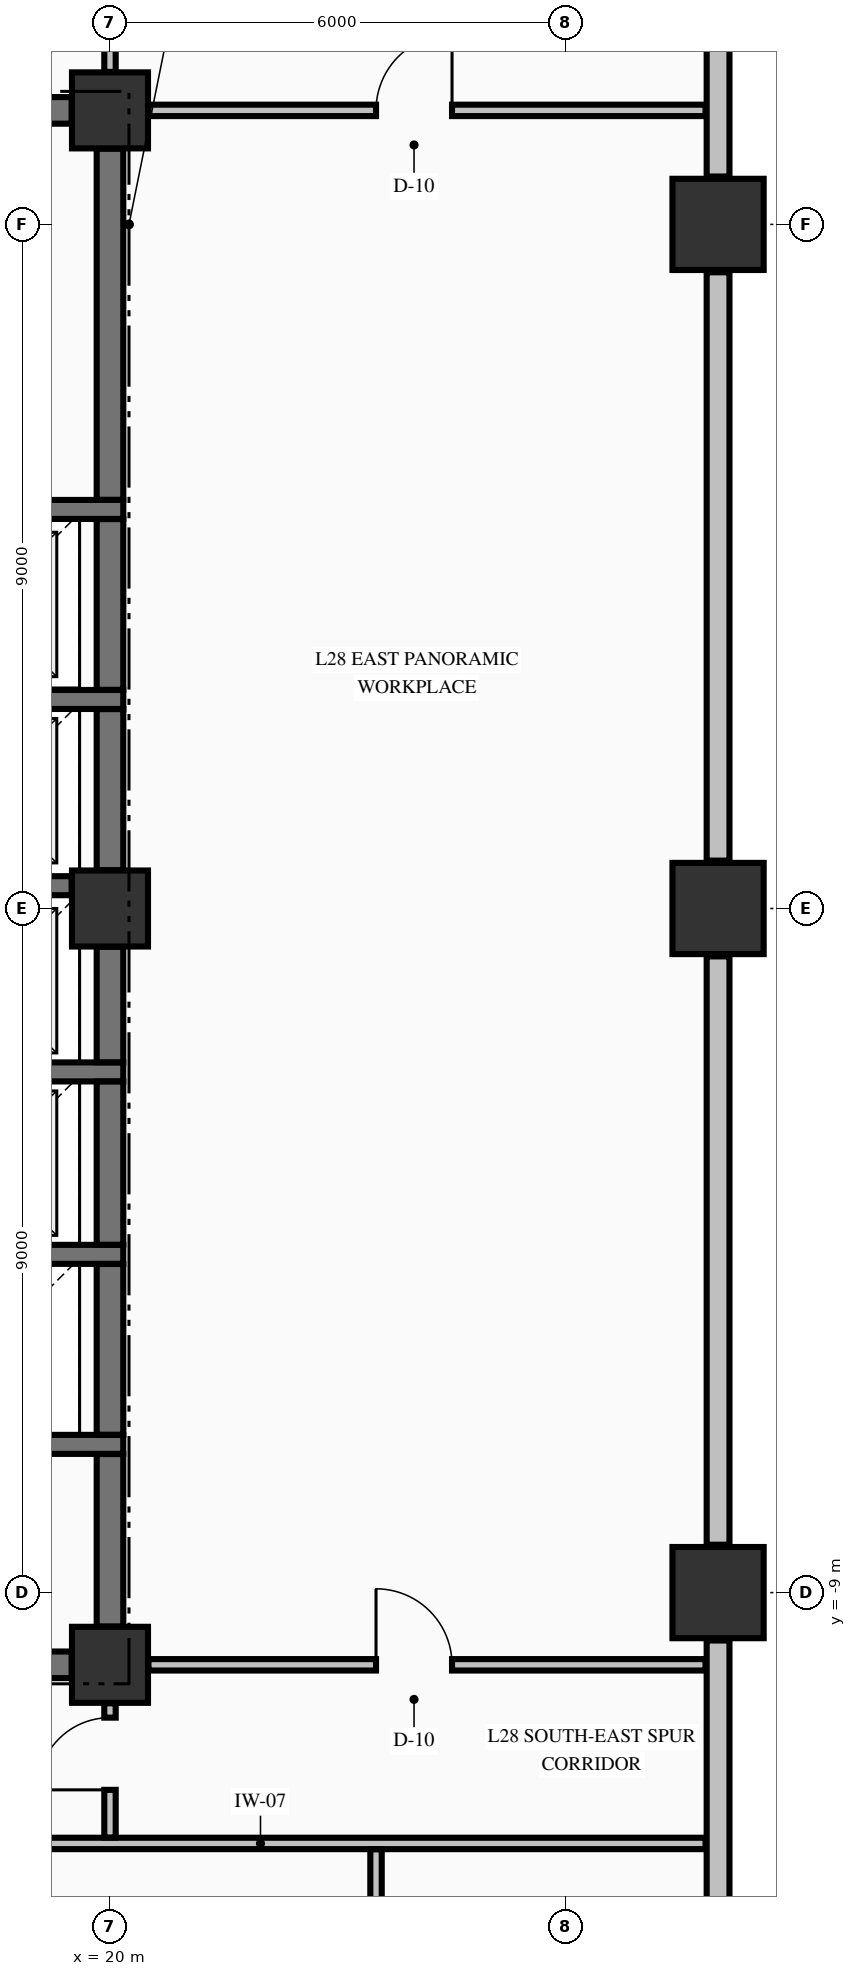
"""IFC4 building model, lengths in metres.
Left out: names, types, materials, properties, quantities, classifications, styles, units other than length and angle.
Written with IfcOpenShell. Run it as: python <this file> out.ifc"""

import sys

from ifc_helpers import new_model, si_unit, direction, frame, frame_2d, origin, origin_2d, place, context, subcontext, project, spatial, rectangle, extrude, element, fill, save


model = new_model("IFC4")
c1 = context("Model", 3, precision=1e-05, world=origin(), true_north=direction((0.0, 1.0)))
c2 = subcontext(c1, "Body", "Model", "MODEL_VIEW")
j1 = project(units=[si_unit("LENGTHUNIT", "METRE"), si_unit("PLANEANGLEUNIT", "RADIAN")], contexts=[c1])
p1 = place(None, origin())
s1 = spatial("IfcSite", under=j1, at=p1, CompositionType="ELEMENT")
p2 = place(p1, origin())
s2 = spatial("IfcBuilding", under=s1, at=p2, CompositionType="ELEMENT")
p3 = place(p2, frame((0.0, 0.0, 112.78)))
s3 = spatial("IfcBuildingStorey", under=s2, at=p3, CompositionType="ELEMENT", Elevation=112.78)
for number, where, z_axis, x_axis in (
    (1, (28.0, -9.0, -0.25), (0.0, 0.0, 1.0), (1.0, 0.0, 0.0)),
    (2, (28.0, 0.0, -0.25), (0.0, 0.0, 1.0), (1.0, 0.0, 0.0)),
    (3, (28.0, 9.0, -0.25), (0.0, 0.0, 1.0), (1.0, 0.0, 0.0)),
):
    element("IfcColumn", number, at=place(p3, frame(where, z_axis=z_axis, x_axis=x_axis)), inside=s3, PredefinedType="COLUMN", context=c2, shape_type="SweptSolid", body=[
        extrude(rectangle(XDim=1.2, YDim=1.2, at=origin_2d()), origin(), (0.0, 0.0, 1.0), 3.395),
    ])
for number, where, z_axis, x_axis in (
    (4, (20.0, -9.95, -0.25), (0.0, 0.0, 1.0), (1.0, 0.0, 0.0)),
    (5, (20.0, 10.5, -0.25), (0.0, 0.0, 1.0), (1.0, 0.0, 0.0)),
    (6, (20.0, 0.0, -0.25), (0.0, 0.0, 1.0), (1.0, 0.0, 0.0)),
):
    element("IfcColumn", number, at=place(p3, frame(where, z_axis=z_axis, x_axis=x_axis)), inside=s3, PredefinedType="COLUMN", context=c2, shape_type="SweptSolid", body=[
        extrude(rectangle(XDim=1.0, YDim=1.0, at=origin_2d()), origin(), (0.0, 0.0, 1.0), 3.395),
    ])
p4 = place(p3, frame((28.0, -20.37, 0.0), z_axis=(0.0, 0.0, 1.0), x_axis=(0.0, 1.0, 0.0)))
e7 = element("IfcWall", 7, at=p4, inside=s3, PredefinedType="STANDARD", context=c2, shape_type="SweptSolid", body=[
    extrude(rectangle(XDim=10.74, YDim=0.3, at=frame_2d((5.37, 0.0))), origin(), (0.0, 0.0, 1.0), 2.537),
])
for number, where, z_axis, x_axis in (
    (8, (28.0, -8.37, 0.0), (0.0, 0.0, 1.0), (0.0, 1.0, 0.0)),
    (9, (28.0, 0.63, 0.0), (0.0, 0.0, 1.0), (0.0, 1.0, 0.0)),
):
    element("IfcWall", number, at=place(p3, frame(where, z_axis=z_axis, x_axis=x_axis)), inside=s3, PredefinedType="STANDARD", context=c2, shape_type="SweptSolid", body=[
        extrude(rectangle(XDim=7.74, YDim=0.3, at=frame_2d((3.87, 0.0))), origin(), (0.0, 0.0, 1.0), 2.537),
    ])
p5 = place(p3, frame((28.0, 9.63, 0.0), z_axis=(0.0, 0.0, 1.0), x_axis=(0.0, 1.0, 0.0)))
e10 = element("IfcWall", 10, at=p5, inside=s3, PredefinedType="STANDARD", context=c2, shape_type="SweptSolid", body=[
    extrude(rectangle(XDim=10.74, YDim=0.3, at=frame_2d((5.37, 0.0))), origin(), (0.0, 0.0, 1.0), 2.537),
])
p6 = place(p3, frame((14.7, -9.95, 0.0), z_axis=(0.0, 0.0, 1.0), x_axis=(1.0, 0.0, 0.0)))
e11 = element("IfcWall", 11, at=p6, inside=s3, PredefinedType="SHEAR", context=c2, shape_type="SweptSolid", body=[
    extrude(rectangle(XDim=4.796, YDim=0.35, at=frame_2d((2.398, 0.0))), origin(), (0.0, 0.0, 1.0), 3.145),
])
p7 = place(p6, frame((0.65, 0.0, 0.0)))
e12 = element("IfcOpeningElement", 12, at=p7, cuts=e11, PredefinedType="OPENING", context=c2, shape_type="SweptSolid", body=[
    extrude(rectangle(XDim=1.2, YDim=2.15, at=frame_2d((0.6, 1.075))), frame((0.0, 0.185, 0.0), z_axis=(0.0, -1.0, 0.0), x_axis=(1.0, 0.0, 0.0)), (0.0, 0.0, 1.0), 0.37),
])
for number, where, z_axis, x_axis in (
    (13, (17.025, -7.05, 0.0), (0.0, 0.0, 1.0), (1.0, 0.0, 0.0)),
    (14, (17.025, -4.55, 0.0), (0.0, 0.0, 1.0), (1.0, 0.0, 0.0)),
    (15, (17.025, -2.15, 0.0), (0.0, 0.0, 1.0), (1.0, 0.0, 0.0)),
):
    element("IfcWall", number, at=place(p3, frame(where, z_axis=z_axis, x_axis=x_axis)), inside=s3, PredefinedType="SOLIDWALL", context=c2, shape_type="SweptSolid", body=[
        extrude(rectangle(XDim=3.15, YDim=0.25, at=frame_2d((1.575, 0.0))), origin(), (0.0, 0.0, 1.0), 3.145),
    ])
p8 = place(p3, frame((17.025, 0.3, 0.0), z_axis=(0.0, 0.0, 1.0), x_axis=(1.0, 0.0, 0.0)))
e16 = element("IfcWall", 16, at=p8, inside=s3, PredefinedType="SOLIDWALL", context=c2, shape_type="SweptSolid", body=[
    extrude(rectangle(XDim=2.471, YDim=0.25, at=frame_2d((1.236, 0.0))), origin(), (0.0, 0.0, 1.0), 3.145),
])
for number, where, z_axis, x_axis in (
    (17, (17.025, 2.75, 0.0), (0.0, 0.0, 1.0), (1.0, 0.0, 0.0)),
    (18, (17.025, 5.25, 0.0), (0.0, 0.0, 1.0), (1.0, 0.0, 0.0)),
):
    element("IfcWall", number, at=place(p3, frame(where, z_axis=z_axis, x_axis=x_axis)), inside=s3, PredefinedType="SOLIDWALL", context=c2, shape_type="SweptSolid", body=[
        extrude(rectangle(XDim=3.15, YDim=0.25, at=frame_2d((1.575, 0.0))), origin(), (0.0, 0.0, 1.0), 3.145),
    ])
p9 = place(p3, frame((14.7, 10.5, 0.0), z_axis=(0.0, 0.0, 1.0), x_axis=(1.0, 0.0, 0.0)))
e19 = element("IfcWall", 19, at=p9, inside=s3, PredefinedType="SHEAR", context=c2, shape_type="SweptSolid", body=[
    extrude(rectangle(XDim=4.796, YDim=0.35, at=frame_2d((2.398, 0.0))), origin(), (0.0, 0.0, 1.0), 3.145),
])
p10 = place(p9, frame((0.65, 0.0, 0.0)))
e20 = element("IfcOpeningElement", 20, at=p10, cuts=e19, PredefinedType="OPENING", context=c2, shape_type="SweptSolid", body=[
    extrude(rectangle(XDim=1.2, YDim=2.15, at=frame_2d((0.6, 1.075))), frame((0.0, 0.185, 0.0), z_axis=(0.0, -1.0, 0.0), x_axis=(1.0, 0.0, 0.0)), (0.0, 0.0, 1.0), 0.37),
])
p11 = place(p9, frame((3.25, 0.0, 0.0)))
e21 = element("IfcOpeningElement", 21, at=p11, cuts=e19, PredefinedType="OPENING", context=c2, shape_type="SweptSolid", body=[
    extrude(rectangle(XDim=0.9, YDim=2.15, at=frame_2d((0.45, 1.075))), frame((0.0, 0.185, 0.0), z_axis=(0.0, -1.0, 0.0), x_axis=(1.0, 0.0, 0.0)), (0.0, 0.0, 1.0), 0.37),
])
p12 = place(p3, frame((-22.835, -12.3, 0.0), z_axis=(0.0, 0.0, 1.0), x_axis=(1.0, 0.0, 0.0)))
e22 = element("IfcWall", 22, at=p12, inside=s3, PredefinedType="PARTITIONING", context=c2, shape_type="SweptSolid", body=[
    extrude(rectangle(XDim=50.67, YDim=0.15, at=frame_2d((25.335, 0.0))), origin(), (0.0, 0.0, 1.0), 3.145),
])
p13 = place(p12, frame((7.21, 0.0, 0.0)))
e23 = element("IfcOpeningElement", 23, at=p13, cuts=e22, PredefinedType="OPENING", context=c2, shape_type="SweptSolid", body=[
    extrude(rectangle(XDim=0.95, YDim=2.15, at=frame_2d((0.475, 1.075))), frame((0.0, 0.085, 0.0), z_axis=(0.0, -1.0, 0.0), x_axis=(1.0, 0.0, 0.0)), (0.0, 0.0, 1.0), 0.17),
])
p14 = place(p12, frame((16.81, 0.0, 0.0)))
e24 = element("IfcOpeningElement", 24, at=p14, cuts=e22, PredefinedType="OPENING", context=c2, shape_type="SweptSolid", body=[
    extrude(rectangle(XDim=1.05, YDim=2.15, at=frame_2d((0.525, 1.075))), frame((0.0, 0.085, 0.0), z_axis=(0.0, -1.0, 0.0), x_axis=(1.0, 0.0, 0.0)), (0.0, 0.0, 1.0), 0.17),
])
p15 = place(p12, frame((28.41, 0.0, 0.0)))
e25 = element("IfcOpeningElement", 25, at=p15, cuts=e22, PredefinedType="OPENING", context=c2, shape_type="SweptSolid", body=[
    extrude(rectangle(XDim=1.05, YDim=2.15, at=frame_2d((0.525, 1.075))), frame((0.0, 0.085, 0.0), z_axis=(0.0, -1.0, 0.0), x_axis=(1.0, 0.0, 0.0)), (0.0, 0.0, 1.0), 0.17),
])
p16 = place(p12, frame((37.91, 0.0, 0.0)))
e26 = element("IfcOpeningElement", 26, at=p16, cuts=e22, PredefinedType="OPENING", context=c2, shape_type="SweptSolid", body=[
    extrude(rectangle(XDim=1.05, YDim=2.15, at=frame_2d((0.525, 1.075))), frame((0.0, 0.085, 0.0), z_axis=(0.0, -1.0, 0.0), x_axis=(1.0, 0.0, 0.0)), (0.0, 0.0, 1.0), 0.17),
])
p17 = place(p3, frame((20.506, -9.95, 0.0), z_axis=(0.0, 0.0, 1.0), x_axis=(1.0, 0.0, 0.0)))
e27 = element("IfcWall", 27, at=p17, inside=s3, PredefinedType="PARTITIONING", context=c2, shape_type="SweptSolid", body=[
    extrude(rectangle(XDim=7.329, YDim=0.15, at=frame_2d((3.665, 0.0))), origin(), (0.0, 0.0, 1.0), 3.145),
])
p18 = place(p17, frame((2.994, 0.0, 0.0)))
e28 = element("IfcOpeningElement", 28, at=p18, cuts=e27, PredefinedType="OPENING", context=c2, shape_type="SweptSolid", body=[
    extrude(rectangle(XDim=1.0, YDim=2.15, at=frame_2d((0.5, 1.075))), frame((0.0, 0.085, 0.0), z_axis=(0.0, -1.0, 0.0), x_axis=(1.0, 0.0, 0.0)), (0.0, 0.0, 1.0), 0.17),
])
p19 = place(p3, frame((20.506, 10.5, 0.0), z_axis=(0.0, 0.0, 1.0), x_axis=(1.0, 0.0, 0.0)))
e29 = element("IfcWall", 29, at=p19, inside=s3, PredefinedType="PARTITIONING", context=c2, shape_type="SweptSolid", body=[
    extrude(rectangle(XDim=7.329, YDim=0.15, at=frame_2d((3.665, 0.0))), origin(), (0.0, 0.0, 1.0), 3.145),
])
p20 = place(p19, frame((2.994, 0.0, 0.0)))
e30 = element("IfcOpeningElement", 30, at=p20, cuts=e29, PredefinedType="OPENING", context=c2, shape_type="SweptSolid", body=[
    extrude(rectangle(XDim=1.0, YDim=2.15, at=frame_2d((0.5, 1.075))), frame((0.0, 0.085, 0.0), z_axis=(0.0, -1.0, 0.0), x_axis=(1.0, 0.0, 0.0)), (0.0, 0.0, 1.0), 0.17),
])
p21 = place(p3, frame((20.0, -9.446, 0.0), z_axis=(0.0, 0.0, 1.0), x_axis=(0.0, 1.0, 0.0)))
e31 = element("IfcWall", 31, at=p21, inside=s3, PredefinedType="SHEAR", context=c2, shape_type="SweptSolid", body=[
    extrude(rectangle(XDim=2.269, YDim=0.35, at=frame_2d((1.135, 0.0))), origin(), (0.0, 0.0, 1.0), 3.145),
])
p22 = place(p3, frame((20.0, -6.923, 0.0), z_axis=(0.0, 0.0, 1.0), x_axis=(0.0, 1.0, 0.0)))
e32 = element("IfcWall", 32, at=p22, inside=s3, PredefinedType="SHEAR", context=c2, shape_type="SweptSolid", body=[
    extrude(rectangle(XDim=2.246, YDim=0.35, at=frame_2d((1.123, 0.0))), origin(), (0.0, 0.0, 1.0), 3.145),
])
p23 = place(p3, frame((20.0, -4.423, 0.0), z_axis=(0.0, 0.0, 1.0), x_axis=(0.0, 1.0, 0.0)))
e33 = element("IfcWall", 33, at=p23, inside=s3, PredefinedType="SHEAR", context=c2, shape_type="SweptSolid", body=[
    extrude(rectangle(XDim=2.146, YDim=0.35, at=frame_2d((1.073, 0.0))), origin(), (0.0, 0.0, 1.0), 3.145),
])
p24 = place(p3, frame((20.0, -2.023, 0.0), z_axis=(0.0, 0.0, 1.0), x_axis=(0.0, 1.0, 0.0)))
e34 = element("IfcWall", 34, at=p24, inside=s3, PredefinedType="SHEAR", context=c2, shape_type="SweptSolid", body=[
    extrude(rectangle(XDim=1.519, YDim=0.35, at=frame_2d((0.76, 0.0))), origin(), (0.0, 0.0, 1.0), 3.145),
])
p25 = place(p3, frame((20.0, 0.504, 0.0), z_axis=(0.0, 0.0, 1.0), x_axis=(0.0, 1.0, 0.0)))
e35 = element("IfcWall", 35, at=p25, inside=s3, PredefinedType="SHEAR", context=c2, shape_type="SweptSolid", body=[
    extrude(rectangle(XDim=2.119, YDim=0.35, at=frame_2d((1.06, 0.0))), origin(), (0.0, 0.0, 1.0), 3.145),
])
p26 = place(p3, frame((20.0, 2.877, 0.0), z_axis=(0.0, 0.0, 1.0), x_axis=(0.0, 1.0, 0.0)))
e36 = element("IfcWall", 36, at=p26, inside=s3, PredefinedType="SHEAR", context=c2, shape_type="SweptSolid", body=[
    extrude(rectangle(XDim=2.246, YDim=0.35, at=frame_2d((1.123, 0.0))), origin(), (0.0, 0.0, 1.0), 3.145),
])
p27 = place(p3, frame((20.0, 5.377, 0.0), z_axis=(0.0, 0.0, 1.0), x_axis=(0.0, 1.0, 0.0)))
e37 = element("IfcWall", 37, at=p27, inside=s3, PredefinedType="SHEAR", context=c2, shape_type="SweptSolid", body=[
    extrude(rectangle(XDim=4.619, YDim=0.35, at=frame_2d((2.31, 0.0))), origin(), (0.0, 0.0, 1.0), 3.145),
])
p28 = place(p3, frame((20.0, -12.222, 0.0), z_axis=(0.0, 0.0, 1.0), x_axis=(0.0, 1.0, 0.0)))
e38 = element("IfcWall", 38, at=p28, inside=s3, PredefinedType="PARTITIONING", context=c2, shape_type="SweptSolid", body=[
    extrude(rectangle(XDim=1.766, YDim=0.15, at=frame_2d((0.883, 0.0))), origin(), (0.0, 0.0, 1.0), 2.635),
])
p29 = place(p28, frame((0.627, 0.0, 0.0)))
e39 = element("IfcOpeningElement", 39, at=p29, cuts=e38, PredefinedType="OPENING", context=c2, shape_type="SweptSolid", body=[
    extrude(rectangle(XDim=0.95, YDim=2.15, at=frame_2d((0.475, 1.075))), frame((0.0, 0.085, 0.0), z_axis=(0.0, -1.0, 0.0), x_axis=(1.0, 0.0, 0.0)), (0.0, 0.0, 1.0), 0.17),
])
p30 = place(p3, frame((20.0, 11.006, 0.0), z_axis=(0.0, 0.0, 1.0), x_axis=(0.0, 1.0, 0.0)))
e40 = element("IfcWall", 40, at=p30, inside=s3, PredefinedType="PARTITIONING", context=c2, shape_type="SweptSolid", body=[
    extrude(rectangle(XDim=2.066, YDim=0.15, at=frame_2d((1.033, 0.0))), origin(), (0.0, 0.0, 1.0), 2.635),
])
p31 = place(p30, frame((0.339, 0.0, 0.0)))
e41 = element("IfcOpeningElement", 41, at=p31, cuts=e40, PredefinedType="OPENING", context=c2, shape_type="SweptSolid", body=[
    extrude(rectangle(XDim=0.95, YDim=2.15, at=frame_2d((0.475, 1.075))), frame((0.0, 0.085, 0.0), z_axis=(0.0, -1.0, 0.0), x_axis=(1.0, 0.0, 0.0)), (0.0, 0.0, 1.0), 0.17),
])
p32 = place(p3, frame((23.5, -20.394, 0.0), z_axis=(0.0, 0.0, 1.0), x_axis=(0.0, 1.0, 0.0)))
e42 = element("IfcWall", 42, at=p32, inside=s3, PredefinedType="PARTITIONING", context=c2, shape_type="SweptSolid", body=[
    extrude(rectangle(XDim=8.016, YDim=0.15, at=frame_2d((4.008, 0.0))), origin(), (0.0, 0.0, 1.0), 3.145),
])
p33 = place(p29, origin())
e43 = element("IfcDoor", 43, at=p33, inside=s3, OperationType="SINGLE_SWING_LEFT", PredefinedType="DOOR", context=c2, shape_type="SweptSolid", body=[
    extrude(rectangle(XDim=0.95, YDim=2.15, at=frame_2d((0.475, 1.075))), frame((0.0, 0.025, 0.0), z_axis=(0.0, -1.0, 0.0), x_axis=(1.0, 0.0, 0.0)), (0.0, 0.0, 1.0), 0.05),
])
fill(e39, e43)
p34 = place(p20, origin())
e44 = element("IfcDoor", 44, at=p34, inside=s3, OperationType="SINGLE_SWING_RIGHT", PredefinedType="DOOR", context=c2, shape_type="SweptSolid", body=[
    extrude(rectangle(XDim=1.0, YDim=2.15, at=frame_2d((0.5, 1.075))), frame((0.0, 0.025, 0.0), z_axis=(0.0, -1.0, 0.0), x_axis=(1.0, 0.0, 0.0)), (0.0, 0.0, 1.0), 0.05),
])
fill(e30, e44)
p35 = place(p18, origin())
e45 = element("IfcDoor", 45, at=p35, inside=s3, OperationType="SINGLE_SWING_LEFT", PredefinedType="DOOR", context=c2, shape_type="SweptSolid", body=[
    extrude(rectangle(XDim=1.0, YDim=2.15, at=frame_2d((0.5, 1.075))), frame((0.0, 0.025, 0.0), z_axis=(0.0, -1.0, 0.0), x_axis=(1.0, 0.0, 0.0)), (0.0, 0.0, 1.0), 0.05),
])
fill(e28, e45)
save(model, sys.argv[1])
